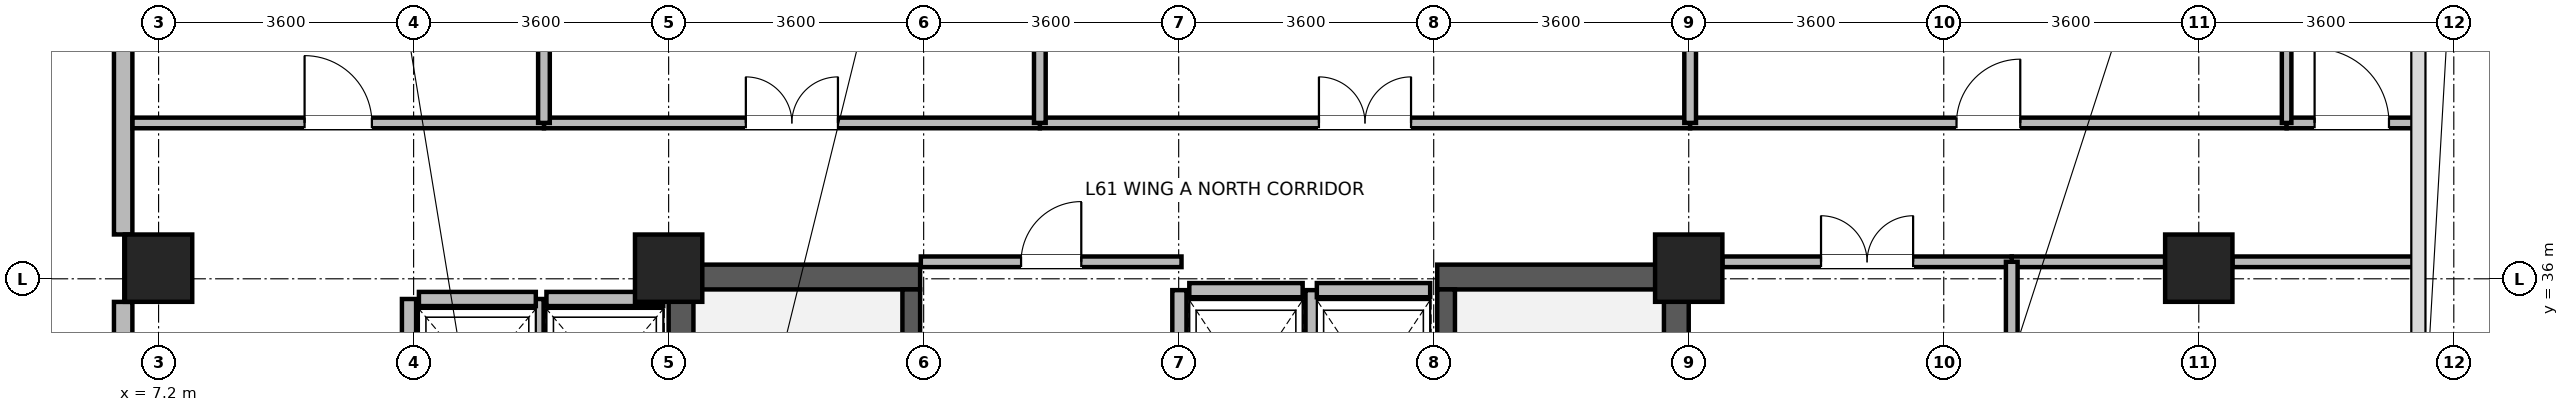
"""IFC4 building model, lengths in metres.
Left out: names, types, materials, properties, quantities, classifications, styles, units other than length and angle.
Written with IfcOpenShell. Run it as: python <this file> out.ifc"""

import sys

from ifc_helpers import new_model, si_unit, direction, frame, frame_2d, origin, origin_2d, place, context, subcontext, project, spatial, rectangle, extrude, source, transform, mapped, element, fill, save


model = new_model("IFC4")
c1 = context("Model", 3, precision=1e-05, world=origin(), true_north=direction((0.0, 1.0)))
c2 = subcontext(c1, "Body", "Model", "MODEL_VIEW")
j1 = project(units=[si_unit("LENGTHUNIT", "METRE"), si_unit("PLANEANGLEUNIT", "RADIAN")], contexts=[c1])
p1 = place(None, origin())
s1 = spatial("IfcSite", under=j1, at=p1, CompositionType="ELEMENT")
p2 = place(p1, origin())
s2 = spatial("IfcBuilding", under=s1, at=p2, CompositionType="ELEMENT")
p3 = place(p2, frame((0.0, 0.0, 238.8)))
s3 = spatial("IfcBuildingStorey", under=s2, at=p3, CompositionType="ELEMENT", Elevation=238.8)
for number, where, z_axis, x_axis in (
    (1, (14.575, 28.5, 0.0), (0.0, 0.0, 1.0), (0.0, 1.0, 0.0)),
    (2, (28.625, 28.5, 0.0), (0.0, 0.0, 1.0), (0.0, 1.0, 0.0)),
):
    element("IfcWall", number, at=place(p3, frame(where, z_axis=z_axis, x_axis=x_axis)), inside=s3, PredefinedType="SHEAR", context=c2, shape_type="SweptSolid", body=[
        extrude(rectangle(XDim=7.7, YDim=0.35, at=frame_2d((3.85, 0.0))), origin(), (0.0, 0.0, 1.0), 3.44),
    ])
for number, where, z_axis, x_axis in (
    (3, (14.75, 36.025, 0.0), (0.0, 0.0, 1.0), (1.0, 0.0, 0.0)),
    (4, (25.25, 36.025, 0.0), (0.0, 0.0, 1.0), (1.0, 0.0, 0.0)),
):
    element("IfcWall", number, at=place(p3, frame(where, z_axis=z_axis, x_axis=x_axis)), inside=s3, PredefinedType="SHEAR", context=c2, shape_type="SweptSolid", body=[
        extrude(rectangle(XDim=3.2, YDim=0.35, at=frame_2d((1.6, 0.0))), origin(), (0.0, 0.0, 1.0), 3.44),
    ])
p4 = place(p3, frame((17.825, 28.85, 0.0), z_axis=(0.0, 0.0, 1.0), x_axis=(0.0, 1.0, 0.0)))
e5 = element("IfcWall", 5, at=p4, inside=s3, PredefinedType="SHEAR", context=c2, shape_type="SweptSolid", body=[
    extrude(rectangle(XDim=7.0, YDim=0.25, at=frame_2d((3.5, 0.0))), origin(), (0.0, 0.0, 1.0), 3.44),
])
p5 = place(p4, frame((0.15, 0.0, 0.0)))
e6 = element("IfcOpeningElement", 6, at=p5, cuts=e5, PredefinedType="OPENING", context=c2, shape_type="SweptSolid", body=[
    extrude(rectangle(XDim=1.1, YDim=2.08, at=frame_2d((0.55, 1.04))), frame((0.0, 0.135, 0.0), z_axis=(0.0, -1.0, 0.0), x_axis=(1.0, 0.0, 0.0)), (0.0, 0.0, 1.0), 0.27),
])
p6 = place(p3, frame((25.375, 28.85, 0.0), z_axis=(0.0, 0.0, 1.0), x_axis=(0.0, 1.0, 0.0)))
e7 = element("IfcWall", 7, at=p6, inside=s3, PredefinedType="SHEAR", context=c2, shape_type="SweptSolid", body=[
    extrude(rectangle(XDim=7.0, YDim=0.25, at=frame_2d((3.5, 0.0))), origin(), (0.0, 0.0, 1.0), 3.44),
])
p7 = place(p6, frame((0.15, 0.0, 0.0)))
e8 = element("IfcOpeningElement", 8, at=p7, cuts=e7, PredefinedType="OPENING", context=c2, shape_type="SweptSolid", body=[
    extrude(rectangle(XDim=1.1, YDim=2.08, at=frame_2d((0.55, 1.04))), frame((0.0, 0.135, 0.0), z_axis=(0.0, -1.0, 0.0), x_axis=(1.0, 0.0, 0.0)), (0.0, 0.0, 1.0), 0.27),
])
m1 = source(origin(), c2, "Body", "SweptSolid", [
    extrude(rectangle(XDim=0.95, YDim=0.95, at=origin_2d()), origin(), (0.0, 0.0, 1.0), 3.7),
])
for number, where, z_axis, x_axis in (
    (9, (7.2, 36.15, 0.0), (0.0, 0.0, 1.0), (1.0, 0.0, 0.0)),
    (10, (14.4, 36.15, 0.0), (0.0, 0.0, 1.0), (1.0, 0.0, 0.0)),
    (11, (28.8, 36.15, 0.0), (0.0, 0.0, 1.0), (1.0, 0.0, 0.0)),
    (12, (36.0, 36.15, 0.0), (0.0, 0.0, 1.0), (1.0, 0.0, 0.0)),
):
    element("IfcColumn", number, at=place(p3, frame(where, z_axis=z_axis, x_axis=x_axis)), inside=s3, PredefinedType="COLUMN", context=c2, shape_type="MappedRepresentation", body=[
        mapped(m1, transform((0.0, 0.0, 0.0), x_axis=(1.0, 0.0, 0.0), y_axis=(0.0, 1.0, 0.0), z_axis=(0.0, 0.0, 1.0), scale=1.0)),
    ])
p8 = place(p3, frame((6.7, 36.626, 0.0), z_axis=(0.0, 0.0, 1.0), x_axis=(0.0, 1.0, 0.0)))
e13 = element("IfcWall", 13, at=p8, inside=s3, PredefinedType="STANDARD", context=c2, shape_type="SweptSolid", body=[
    extrude(rectangle(XDim=6.704, YDim=0.26, at=frame_2d((3.352, 0.0))), origin(), (0.0, 0.0, 1.0), 3.42),
])
p9 = place(p8, frame((4.428, 0.0, 0.85)))
e14 = element("IfcOpeningElement", 14, at=p9, cuts=e13, PredefinedType="OPENING", context=c2, shape_type="SweptSolid", body=[
    extrude(rectangle(XDim=1.2, YDim=1.75, at=frame_2d((0.6, 0.875))), frame((0.0, 0.14, 0.0), z_axis=(0.0, -1.0, 0.0), x_axis=(1.0, 0.0, 0.0)), (0.0, 0.0, 1.0), 0.28),
])
p10 = place(p8, frame((2.877, 0.0, 0.85)))
e15 = element("IfcOpeningElement", 15, at=p10, cuts=e13, PredefinedType="OPENING", context=c2, shape_type="SweptSolid", body=[
    extrude(rectangle(XDim=0.95, YDim=1.75, at=frame_2d((0.475, 0.875))), frame((0.0, 0.14, 0.0), z_axis=(0.0, -1.0, 0.0), x_axis=(1.0, 0.0, 0.0)), (0.0, 0.0, 1.0), 0.28),
])
p11 = place(p3, frame((6.7, 29.126, 0.0), z_axis=(0.0, 0.0, 1.0), x_axis=(0.0, 1.0, 0.0)))
e16 = element("IfcWall", 16, at=p11, inside=s3, PredefinedType="STANDARD", context=c2, shape_type="SweptSolid", body=[
    extrude(rectangle(XDim=6.548, YDim=0.26, at=frame_2d((3.274, 0.0))), origin(), (0.0, 0.0, 1.0), 3.42),
])
p12 = place(p11, frame((1.037, 0.0, 0.85)))
e17 = element("IfcOpeningElement", 17, at=p12, cuts=e16, PredefinedType="OPENING", context=c2, shape_type="SweptSolid", body=[
    extrude(rectangle(XDim=1.2, YDim=1.75, at=frame_2d((0.6, 0.875))), frame((0.0, 0.14, 0.0), z_axis=(0.0, -1.0, 0.0), x_axis=(1.0, 0.0, 0.0)), (0.0, 0.0, 1.0), 0.28),
])
p13 = place(p11, frame((4.311, 0.0, 0.85)))
e18 = element("IfcOpeningElement", 18, at=p13, cuts=e16, PredefinedType="OPENING", context=c2, shape_type="SweptSolid", body=[
    extrude(rectangle(XDim=1.2, YDim=1.75, at=frame_2d((0.6, 0.875))), frame((0.0, 0.14, 0.0), z_axis=(0.0, -1.0, 0.0), x_axis=(1.0, 0.0, 0.0)), (0.0, 0.0, 1.0), 0.28),
])
p14 = place(p3, frame((12.675, 35.715, 0.0), z_axis=(0.0, 0.0, 1.0), x_axis=(1.0, 0.0, 0.0)))
e19 = element("IfcWall", 19, at=p14, inside=s3, PredefinedType="PARTITIONING", context=c2, shape_type="SweptSolid", body=[
    extrude(rectangle(XDim=1.65, YDim=0.2, at=frame_2d((0.825, 0.0))), origin(), (0.0, 0.0, 1.0), 3.42),
])
p15 = place(p3, frame((12.535, 33.485, 0.0), z_axis=(0.0, 0.0, 1.0), x_axis=(0.0, 1.0, 0.0)))
e20 = element("IfcWall", 20, at=p15, inside=s3, PredefinedType="PARTITIONING", context=c2, shape_type="SweptSolid", body=[
    extrude(rectangle(XDim=2.23, YDim=0.2, at=frame_2d((1.115, 0.0))), origin(), (0.0, 0.0, 1.0), 3.42),
])
p16 = place(p3, frame((10.875, 35.715, 0.0), z_axis=(0.0, 0.0, 1.0), x_axis=(1.0, 0.0, 0.0)))
e21 = element("IfcWall", 21, at=p16, inside=s3, PredefinedType="PARTITIONING", context=c2, shape_type="SweptSolid", body=[
    extrude(rectangle(XDim=1.65, YDim=0.2, at=frame_2d((0.825, 0.0))), origin(), (0.0, 0.0, 1.0), 3.42),
])
p17 = place(p3, frame((10.735, 33.485, 0.0), z_axis=(0.0, 0.0, 1.0), x_axis=(0.0, 1.0, 0.0)))
e22 = element("IfcWall", 22, at=p17, inside=s3, PredefinedType="PARTITIONING", context=c2, shape_type="SweptSolid", body=[
    extrude(rectangle(XDim=2.23, YDim=0.2, at=frame_2d((1.115, 0.0))), origin(), (0.0, 0.0, 1.0), 3.42),
])
p18 = place(p3, frame((21.75, 35.84, 0.0), z_axis=(0.0, 0.0, 1.0), x_axis=(1.0, 0.0, 0.0)))
e23 = element("IfcWall", 23, at=p18, inside=s3, PredefinedType="PARTITIONING", context=c2, shape_type="SweptSolid", body=[
    extrude(rectangle(XDim=1.6, YDim=0.2, at=frame_2d((0.8, 0.0))), origin(), (0.0, 0.0, 1.0), 2.52),
])
for number, where, z_axis, x_axis in (
    (24, (21.61, 33.16, 0.0), (0.0, 0.0, 1.0), (0.0, 1.0, 0.0)),
    (25, (23.49, 33.16, 0.0), (0.0, 0.0, 1.0), (0.0, 1.0, 0.0)),
):
    element("IfcWall", number, at=place(p3, frame(where, z_axis=z_axis, x_axis=x_axis)), inside=s3, PredefinedType="PARTITIONING", context=c2, shape_type="SweptSolid", body=[
        extrude(rectangle(XDim=2.68, YDim=0.2, at=frame_2d((1.34, 0.0))), origin(), (0.0, 0.0, 1.0), 3.42),
    ])
p19 = place(p3, frame((23.55, 35.84, 0.0), z_axis=(0.0, 0.0, 1.0), x_axis=(1.0, 0.0, 0.0)))
e26 = element("IfcWall", 26, at=p19, inside=s3, PredefinedType="PARTITIONING", context=c2, shape_type="SweptSolid", body=[
    extrude(rectangle(XDim=1.6, YDim=0.2, at=frame_2d((0.8, 0.0))), origin(), (0.0, 0.0, 1.0), 2.52),
])
p20 = place(p3, frame((19.64, 38.2, 0.0), z_axis=(0.0, 0.0, 1.0), x_axis=(1.0, 0.0, 0.0)))
e27 = element("IfcWall", 27, at=p20, inside=s3, PredefinedType="PARTITIONING", context=c2, shape_type="SweptSolid", body=[
    extrude(rectangle(XDim=9.18, YDim=0.15, at=frame_2d((4.59, 0.0))), origin(), (0.0, 0.0, 1.0), 3.42),
])
p21 = place(p20, frame((3.94, 0.0, 0.0)))
e28 = element("IfcOpeningElement", 28, at=p21, cuts=e27, PredefinedType="OPENING", context=c2, shape_type="SweptSolid", body=[
    extrude(rectangle(XDim=1.3, YDim=2.12, at=frame_2d((0.65, 1.06))), frame((0.0, 0.085, 0.0), z_axis=(0.0, -1.0, 0.0), x_axis=(1.0, 0.0, 0.0)), (0.0, 0.0, 1.0), 0.17),
])
p22 = place(p3, frame((28.82, 38.2, 0.0), z_axis=(0.0, 0.0, 1.0), x_axis=(1.0, 0.0, 0.0)))
e29 = element("IfcWall", 29, at=p22, inside=s3, PredefinedType="PARTITIONING", context=c2, shape_type="SweptSolid", body=[
    extrude(rectangle(XDim=8.42, YDim=0.15, at=frame_2d((4.21, 0.0))), origin(), (0.0, 0.0, 1.0), 3.42),
])
p23 = place(p22, frame((3.76, 0.0, 0.0)))
e30 = element("IfcOpeningElement", 30, at=p23, cuts=e29, PredefinedType="OPENING", context=c2, shape_type="SweptSolid", body=[
    extrude(rectangle(XDim=0.9, YDim=2.08, at=frame_2d((0.45, 1.04))), frame((0.0, 0.085, 0.0), z_axis=(0.0, -1.0, 0.0), x_axis=(1.0, 0.0, 0.0)), (0.0, 0.0, 1.0), 0.17),
])
p24 = place(p3, frame((12.64, 38.2, 0.0), z_axis=(0.0, 0.0, 1.0), x_axis=(1.0, 0.0, 0.0)))
e31 = element("IfcWall", 31, at=p24, inside=s3, PredefinedType="PARTITIONING", context=c2, shape_type="SweptSolid", body=[
    extrude(rectangle(XDim=7.0, YDim=0.15, at=frame_2d((3.5, 0.0))), origin(), (0.0, 0.0, 1.0), 3.42),
])
p25 = place(p24, frame((2.85, 0.0, 0.0)))
e32 = element("IfcOpeningElement", 32, at=p25, cuts=e31, PredefinedType="OPENING", context=c2, shape_type="SweptSolid", body=[
    extrude(rectangle(XDim=1.3, YDim=2.12, at=frame_2d((0.65, 1.06))), frame((0.0, 0.085, 0.0), z_axis=(0.0, -1.0, 0.0), x_axis=(1.0, 0.0, 0.0)), (0.0, 0.0, 1.0), 0.17),
])
p26 = place(p3, frame((6.832, 38.2, 0.0), z_axis=(0.0, 0.0, 1.0), x_axis=(1.0, 0.0, 0.0)))
e33 = element("IfcWall", 33, at=p26, inside=s3, PredefinedType="PARTITIONING", context=c2, shape_type="SweptSolid", body=[
    extrude(rectangle(XDim=5.808, YDim=0.15, at=frame_2d((2.904, 0.0))), origin(), (0.0, 0.0, 1.0), 3.42),
])
p27 = place(p26, frame((2.429, 0.0, 0.0)))
e34 = element("IfcOpeningElement", 34, at=p27, cuts=e33, PredefinedType="OPENING", context=c2, shape_type="SweptSolid", body=[
    extrude(rectangle(XDim=0.95, YDim=2.1, at=frame_2d((0.475, 1.05))), frame((0.0, 0.085, 0.0), z_axis=(0.0, -1.0, 0.0), x_axis=(1.0, 0.0, 0.0)), (0.0, 0.0, 1.0), 0.17),
])
p28 = place(p3, frame((33.36, 36.24, 0.0), z_axis=(0.0, 0.0, 1.0), x_axis=(1.0, 0.0, 0.0)))
e35 = element("IfcWall", 35, at=p28, inside=s3, PredefinedType="PARTITIONING", context=c2, shape_type="SweptSolid", body=[
    extrude(rectangle(XDim=2.165, YDim=0.15, at=frame_2d((1.083, 0.0))), origin(), (0.0, 0.0, 1.0), 2.87),
])
p29 = place(p3, frame((36.475, 36.24, 0.0), z_axis=(0.0, 0.0, 1.0), x_axis=(1.0, 0.0, 0.0)))
e36 = element("IfcWall", 36, at=p29, inside=s3, PredefinedType="PARTITIONING", context=c2, shape_type="SweptSolid", body=[
    extrude(rectangle(XDim=2.605, YDim=0.15, at=frame_2d((1.302, 0.0))), origin(), (0.0, 0.0, 1.0), 3.42),
])
p30 = place(p3, frame((29.275, 36.24, 0.0), z_axis=(0.0, 0.0, 1.0), x_axis=(1.0, 0.0, 0.0)))
e37 = element("IfcWall", 37, at=p30, inside=s3, PredefinedType="PARTITIONING", context=c2, shape_type="SweptSolid", body=[
    extrude(rectangle(XDim=4.085, YDim=0.15, at=frame_2d((2.042, 0.0))), origin(), (0.0, 0.0, 1.0), 2.87),
])
p31 = place(p30, frame((1.393, 0.0, 0.0)))
e38 = element("IfcOpeningElement", 38, at=p31, cuts=e37, PredefinedType="OPENING", context=c2, shape_type="SweptSolid", body=[
    extrude(rectangle(XDim=1.3, YDim=2.12, at=frame_2d((0.65, 1.06))), frame((0.0, 0.085, 0.0), z_axis=(0.0, -1.0, 0.0), x_axis=(1.0, 0.0, 0.0)), (0.0, 0.0, 1.0), 0.17),
])
p32 = place(p3, frame((17.96, 36.24, 0.0), z_axis=(0.0, 0.0, 1.0), x_axis=(1.0, 0.0, 0.0)))
e39 = element("IfcWall", 39, at=p32, inside=s3, PredefinedType="PARTITIONING", context=c2, shape_type="SweptSolid", body=[
    extrude(rectangle(XDim=3.68, YDim=0.15, at=frame_2d((1.84, 0.0))), origin(), (0.0, 0.0, 1.0), 2.52),
])
p33 = place(p32, frame((1.415, 0.0, 0.0)))
e40 = element("IfcOpeningElement", 40, at=p33, cuts=e39, PredefinedType="OPENING", context=c2, shape_type="SweptSolid", body=[
    extrude(rectangle(XDim=0.85, YDim=2.04, at=frame_2d((0.425, 1.02))), frame((0.0, 0.085, 0.0), z_axis=(0.0, -1.0, 0.0), x_axis=(1.0, 0.0, 0.0)), (0.0, 0.0, 1.0), 0.17),
])
p34 = place(p3, frame((37.24, 38.2, 0.0), z_axis=(0.0, 0.0, 1.0), x_axis=(1.0, 0.0, 0.0)))
e41 = element("IfcWall", 41, at=p34, inside=s3, PredefinedType="PARTITIONING", context=c2, shape_type="SweptSolid", body=[
    extrude(rectangle(XDim=1.84, YDim=0.15, at=frame_2d((0.92, 0.0))), origin(), (0.0, 0.0, 1.0), 3.42),
])
p35 = place(p34, frame((0.395, 0.0, 0.0)))
e42 = element("IfcOpeningElement", 42, at=p35, cuts=e41, PredefinedType="OPENING", context=c2, shape_type="SweptSolid", body=[
    extrude(rectangle(XDim=1.05, YDim=2.12, at=frame_2d((0.525, 1.06))), frame((0.0, 0.085, 0.0), z_axis=(0.0, -1.0, 0.0), x_axis=(1.0, 0.0, 0.0)), (0.0, 0.0, 1.0), 0.17),
])
p36 = place(p3, frame((19.64, 38.2, 0.0), z_axis=(0.0, 0.0, 1.0), x_axis=(0.0, 1.0, 0.0)))
e43 = element("IfcWall", 43, at=p36, inside=s3, PredefinedType="PARTITIONING", context=c2, shape_type="SweptSolid", body=[
    extrude(rectangle(XDim=4.868, YDim=0.165, at=frame_2d((2.434, 0.0))), origin(), (0.0, 0.0, 1.0), 3.42),
])
p37 = place(p3, frame((28.82, 38.2, 0.0), z_axis=(0.0, 0.0, 1.0), x_axis=(0.0, 1.0, 0.0)))
e44 = element("IfcWall", 44, at=p37, inside=s3, PredefinedType="PARTITIONING", context=c2, shape_type="SweptSolid", body=[
    extrude(rectangle(XDim=4.868, YDim=0.165, at=frame_2d((2.434, 0.0))), origin(), (0.0, 0.0, 1.0), 2.97),
])
p38 = place(p3, frame((37.24, 38.2, 0.0), z_axis=(0.0, 0.0, 1.0), x_axis=(0.0, 1.0, 0.0)))
e45 = element("IfcWall", 45, at=p38, inside=s3, PredefinedType="PARTITIONING", context=c2, shape_type="SweptSolid", body=[
    extrude(rectangle(XDim=4.868, YDim=0.135, at=frame_2d((2.434, 0.0))), origin(), (0.0, 0.0, 1.0), 3.42),
])
p39 = place(p3, frame((33.36, 32.4, 0.0), z_axis=(0.0, 0.0, 1.0), x_axis=(0.0, 1.0, 0.0)))
e46 = element("IfcWall", 46, at=p39, inside=s3, PredefinedType="PARTITIONING", context=c2, shape_type="SweptSolid", body=[
    extrude(rectangle(XDim=3.84, YDim=0.165, at=frame_2d((1.92, 0.0))), origin(), (0.0, 0.0, 1.0), 3.42),
])
p40 = place(p3, frame((12.64, 38.2, 0.0), z_axis=(0.0, 0.0, 1.0), x_axis=(0.0, 1.0, 0.0)))
e47 = element("IfcWall", 47, at=p40, inside=s3, PredefinedType="PARTITIONING", context=c2, shape_type="SweptSolid", body=[
    extrude(rectangle(XDim=3.1, YDim=0.165, at=frame_2d((1.55, 0.0))), origin(), (0.0, 0.0, 1.0), 3.42),
])
p41 = place(p21, origin())
e48 = element("IfcDoor", 48, at=p41, inside=s3, OperationType="DOUBLE_DOOR_SINGLE_SWING", PredefinedType="DOOR", context=c2, shape_type="SweptSolid", body=[
    extrude(rectangle(XDim=1.3, YDim=2.12, at=frame_2d((0.65, 1.06))), frame((0.0, 0.025, 0.0), z_axis=(0.0, -1.0, 0.0), x_axis=(1.0, 0.0, 0.0)), (0.0, 0.0, 1.0), 0.05),
])
fill(e28, e48)
p42 = place(p23, origin())
e49 = element("IfcDoor", 49, at=p42, inside=s3, OperationType="SINGLE_SWING_RIGHT", PredefinedType="DOOR", context=c2, shape_type="SweptSolid", body=[
    extrude(rectangle(XDim=0.9, YDim=2.08, at=frame_2d((0.45, 1.04))), frame((0.0, 0.025, 0.0), z_axis=(0.0, -1.0, 0.0), x_axis=(1.0, 0.0, 0.0)), (0.0, 0.0, 1.0), 0.05),
])
fill(e30, e49)
p43 = place(p25, origin())
e50 = element("IfcDoor", 50, at=p43, inside=s3, OperationType="DOUBLE_DOOR_SINGLE_SWING", PredefinedType="DOOR", context=c2, shape_type="SweptSolid", body=[
    extrude(rectangle(XDim=1.3, YDim=2.12, at=frame_2d((0.65, 1.06))), frame((0.0, 0.025, 0.0), z_axis=(0.0, -1.0, 0.0), x_axis=(1.0, 0.0, 0.0)), (0.0, 0.0, 1.0), 0.05),
])
fill(e32, e50)
p44 = place(p27, origin())
e51 = element("IfcDoor", 51, at=p44, inside=s3, OperationType="SINGLE_SWING_LEFT", PredefinedType="DOOR", context=c2, shape_type="SweptSolid", body=[
    extrude(rectangle(XDim=0.95, YDim=2.1, at=frame_2d((0.475, 1.05))), frame((0.0, 0.025, 0.0), z_axis=(0.0, -1.0, 0.0), x_axis=(1.0, 0.0, 0.0)), (0.0, 0.0, 1.0), 0.05),
])
fill(e34, e51)
p45 = place(p31, origin())
e52 = element("IfcDoor", 52, at=p45, inside=s3, OperationType="DOUBLE_DOOR_SINGLE_SWING", PredefinedType="DOOR", context=c2, shape_type="SweptSolid", body=[
    extrude(rectangle(XDim=1.3, YDim=2.12, at=frame_2d((0.65, 1.06))), frame((0.0, 0.025, 0.0), z_axis=(0.0, -1.0, 0.0), x_axis=(1.0, 0.0, 0.0)), (0.0, 0.0, 1.0), 0.05),
])
fill(e38, e52)
p46 = place(p33, origin())
e53 = element("IfcDoor", 53, at=p46, inside=s3, OperationType="SINGLE_SWING_RIGHT", PredefinedType="DOOR", context=c2, shape_type="SweptSolid", body=[
    extrude(rectangle(XDim=0.85, YDim=2.04, at=frame_2d((0.425, 1.02))), frame((0.0, 0.025, 0.0), z_axis=(0.0, -1.0, 0.0), x_axis=(1.0, 0.0, 0.0)), (0.0, 0.0, 1.0), 0.05),
])
fill(e40, e53)
p47 = place(p35, origin())
e54 = element("IfcDoor", 54, at=p47, inside=s3, OperationType="SINGLE_SWING_LEFT", PredefinedType="DOOR", context=c2, shape_type="SweptSolid", body=[
    extrude(rectangle(XDim=1.05, YDim=2.12, at=frame_2d((0.525, 1.06))), frame((0.0, 0.025, 0.0), z_axis=(0.0, -1.0, 0.0), x_axis=(1.0, 0.0, 0.0)), (0.0, 0.0, 1.0), 0.05),
])
fill(e42, e54)
save(model, sys.argv[1])
